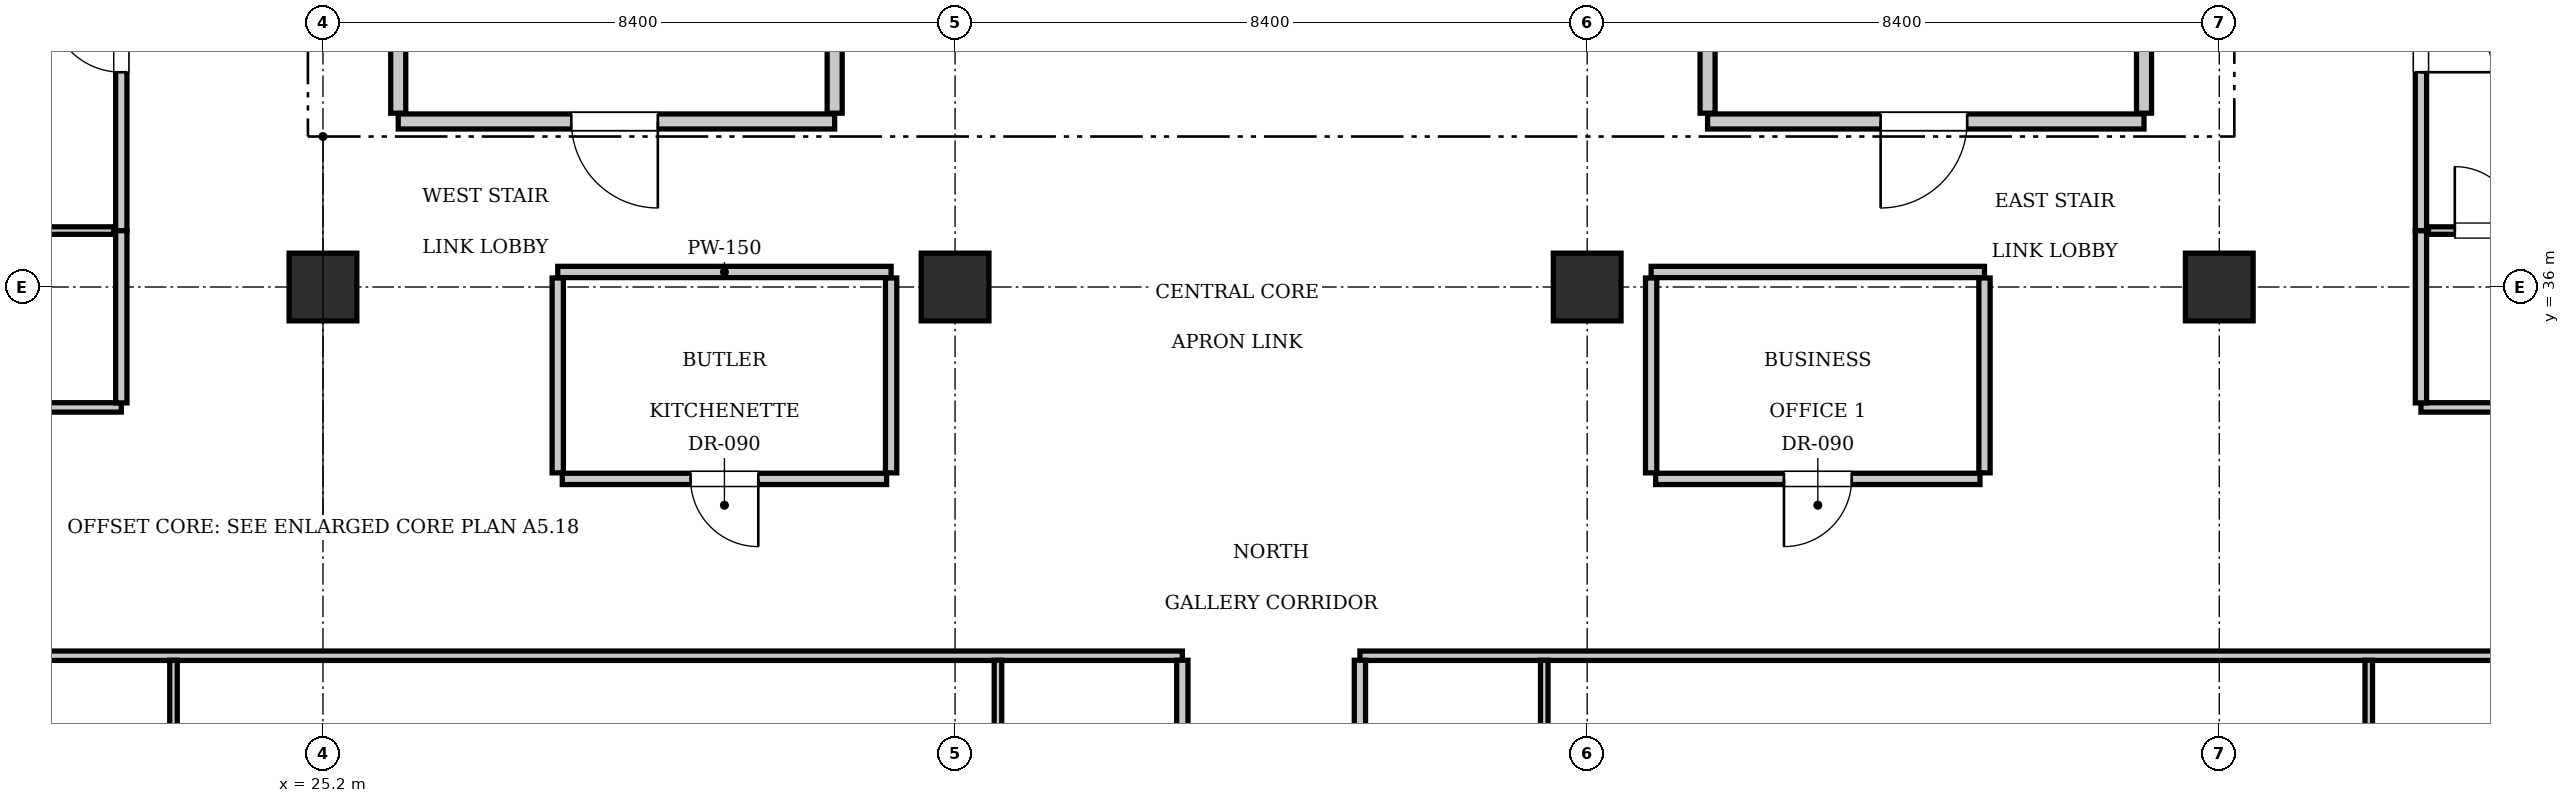
"""IFC4 building model, lengths in metres.
Left out: names, types, materials, properties, quantities, classifications, styles, units other than length and angle.
Written with IfcOpenShell. Run it as: python <this file> out.ifc"""

import sys

from ifc_helpers import new_model, si_unit, direction, frame, frame_2d, origin, origin_2d, place, context, subcontext, project, spatial, rectangle, extrude, element, fill, save


model = new_model("IFC4")
c1 = context("Model", 3, precision=1e-05, world=origin(), true_north=direction((0.0, 1.0)))
c2 = subcontext(c1, "Body", "Model", "MODEL_VIEW")
j1 = project(units=[si_unit("LENGTHUNIT", "METRE"), si_unit("PLANEANGLEUNIT", "RADIAN")], contexts=[c1])
p1 = place(None, origin())
s1 = spatial("IfcSite", under=j1, at=p1, CompositionType="ELEMENT")
p2 = place(p1, origin())
s2 = spatial("IfcBuilding", under=s1, at=p2, CompositionType="ELEMENT")
p3 = place(p2, frame((0.0, 0.0, 131.25)))
s3 = spatial("IfcBuildingStorey", under=s2, at=p3, CompositionType="ELEMENT", Elevation=131.25)
for number, where, z_axis, x_axis in (
    (1, (25.2, 36.0, 0.0), (0.0, 0.0, 1.0), (1.0, 0.0, 0.0)),
    (2, (33.6, 36.0, 0.0), (0.0, 0.0, 1.0), (1.0, 0.0, 0.0)),
    (3, (42.0, 36.0, 0.0), (0.0, 0.0, 1.0), (1.0, 0.0, 0.0)),
    (4, (50.4, 36.0, 0.0), (0.0, 0.0, 1.0), (1.0, 0.0, 0.0)),
):
    element("IfcColumn", number, at=place(p3, frame(where, z_axis=z_axis, x_axis=x_axis)), inside=s3, PredefinedType="COLUMN", context=c2, shape_type="SweptSolid", body=[
        extrude(rectangle(XDim=0.9, YDim=0.9, at=origin_2d()), origin(), (0.0, 0.0, 1.0), 3.85),
    ])
p4 = place(p3, frame((26.2, 38.2, 0.0), z_axis=(0.0, 0.0, 1.0), x_axis=(1.0, 0.0, 0.0)))
e5 = element("IfcWall", 5, at=p4, inside=s3, PredefinedType="PARTITIONING", context=c2, shape_type="SweptSolid", body=[
    extrude(rectangle(XDim=5.8, YDim=0.2, at=frame_2d((2.9, 0.0))), origin(), (0.0, 0.0, 1.0), 3.61),
])
p5 = place(p4, frame((2.3, 0.0, 0.0)))
e6 = element("IfcOpeningElement", 6, at=p5, cuts=e5, PredefinedType="OPENING", context=c2, shape_type="SweptSolid", body=[
    extrude(rectangle(XDim=1.15, YDim=2.15, at=frame_2d((0.575, 1.075))), frame((0.0, 0.11, 0.0), z_axis=(0.0, -1.0, 0.0), x_axis=(1.0, 0.0, 0.0)), (0.0, 0.0, 1.0), 0.22),
])
for number, where, z_axis, x_axis in (
    (7, (26.2, 38.31, 0.0), (0.0, 0.0, 1.0), (0.0, 1.0, 0.0)),
    (8, (32.0, 38.31, 0.0), (0.0, 0.0, 1.0), (0.0, 1.0, 0.0)),
):
    element("IfcWall", number, at=place(p3, frame(where, z_axis=z_axis, x_axis=x_axis)), inside=s3, PredefinedType="PARTITIONING", context=c2, shape_type="SweptSolid", body=[
        extrude(rectangle(XDim=3.07, YDim=0.2, at=frame_2d((1.535, 0.0))), origin(), (0.0, 0.0, 1.0), 3.61),
    ])
p6 = place(p3, frame((43.6, 38.2, 0.0), z_axis=(0.0, 0.0, 1.0), x_axis=(1.0, 0.0, 0.0)))
e9 = element("IfcWall", 9, at=p6, inside=s3, PredefinedType="PARTITIONING", context=c2, shape_type="SweptSolid", body=[
    extrude(rectangle(XDim=5.8, YDim=0.2, at=frame_2d((2.9, 0.0))), origin(), (0.0, 0.0, 1.0), 3.61),
])
p7 = place(p6, frame((2.3, 0.0, 0.0)))
e10 = element("IfcOpeningElement", 10, at=p7, cuts=e9, PredefinedType="OPENING", context=c2, shape_type="SweptSolid", body=[
    extrude(rectangle(XDim=1.15, YDim=2.15, at=frame_2d((0.575, 1.075))), frame((0.0, 0.11, 0.0), z_axis=(0.0, -1.0, 0.0), x_axis=(1.0, 0.0, 0.0)), (0.0, 0.0, 1.0), 0.22),
])
for number, where, z_axis, x_axis in (
    (11, (43.6, 38.31, 0.0), (0.0, 0.0, 1.0), (0.0, 1.0, 0.0)),
    (12, (49.4, 38.31, 0.0), (0.0, 0.0, 1.0), (0.0, 1.0, 0.0)),
):
    element("IfcWall", number, at=place(p3, frame(where, z_axis=z_axis, x_axis=x_axis)), inside=s3, PredefinedType="PARTITIONING", context=c2, shape_type="SweptSolid", body=[
        extrude(rectangle(XDim=3.07, YDim=0.2, at=frame_2d((1.535, 0.0))), origin(), (0.0, 0.0, 1.0), 3.61),
    ])
p8 = place(p3, frame((28.32, 36.2, 0.0), z_axis=(0.0, 0.0, 1.0), x_axis=(1.0, 0.0, 0.0)))
e13 = element("IfcWall", 13, at=p8, inside=s3, PredefinedType="PARTITIONING", context=c2, shape_type="SweptSolid", body=[
    extrude(rectangle(XDim=4.43, YDim=0.15, at=frame_2d((2.215, 0.0))), origin(), (0.0, 0.0, 1.0), 3.61),
])
for number, where, z_axis, x_axis in (
    (14, (28.32, 33.53, 0.0), (0.0, 0.0, 1.0), (0.0, 1.0, 0.0)),
    (15, (32.75, 33.53, 0.0), (0.0, 0.0, 1.0), (0.0, 1.0, 0.0)),
):
    element("IfcWall", number, at=place(p3, frame(where, z_axis=z_axis, x_axis=x_axis)), inside=s3, PredefinedType="PARTITIONING", context=c2, shape_type="SweptSolid", body=[
        extrude(rectangle(XDim=2.59, YDim=0.15, at=frame_2d((1.295, 0.0))), origin(), (0.0, 0.0, 1.0), 3.61),
    ])
p9 = place(p3, frame((28.38, 33.45, 0.0), z_axis=(0.0, 0.0, 1.0), x_axis=(1.0, 0.0, 0.0)))
e16 = element("IfcWall", 16, at=p9, inside=s3, PredefinedType="PARTITIONING", context=c2, shape_type="SweptSolid", body=[
    extrude(rectangle(XDim=4.31, YDim=0.15, at=frame_2d((2.155, 0.0))), origin(), (0.0, 0.0, 1.0), 3.61),
])
p10 = place(p9, frame((1.705, 0.0, 0.0)))
e17 = element("IfcOpeningElement", 17, at=p10, cuts=e16, PredefinedType="OPENING", context=c2, shape_type="SweptSolid", body=[
    extrude(rectangle(XDim=0.9, YDim=2.1, at=frame_2d((0.45, 1.05))), frame((0.0, 0.085, 0.0), z_axis=(0.0, -1.0, 0.0), x_axis=(1.0, 0.0, 0.0)), (0.0, 0.0, 1.0), 0.17),
])
p11 = place(p3, frame((42.85, 36.2, 0.0), z_axis=(0.0, 0.0, 1.0), x_axis=(1.0, 0.0, 0.0)))
e18 = element("IfcWall", 18, at=p11, inside=s3, PredefinedType="PARTITIONING", context=c2, shape_type="SweptSolid", body=[
    extrude(rectangle(XDim=4.43, YDim=0.15, at=frame_2d((2.215, 0.0))), origin(), (0.0, 0.0, 1.0), 3.61),
])
for number, where, z_axis, x_axis in (
    (19, (42.85, 33.53, 0.0), (0.0, 0.0, 1.0), (0.0, 1.0, 0.0)),
    (20, (47.28, 33.53, 0.0), (0.0, 0.0, 1.0), (0.0, 1.0, 0.0)),
):
    element("IfcWall", number, at=place(p3, frame(where, z_axis=z_axis, x_axis=x_axis)), inside=s3, PredefinedType="PARTITIONING", context=c2, shape_type="SweptSolid", body=[
        extrude(rectangle(XDim=2.59, YDim=0.15, at=frame_2d((1.295, 0.0))), origin(), (0.0, 0.0, 1.0), 3.61),
    ])
p12 = place(p3, frame((42.91, 33.45, 0.0), z_axis=(0.0, 0.0, 1.0), x_axis=(1.0, 0.0, 0.0)))
e21 = element("IfcWall", 21, at=p12, inside=s3, PredefinedType="PARTITIONING", context=c2, shape_type="SweptSolid", body=[
    extrude(rectangle(XDim=4.31, YDim=0.15, at=frame_2d((2.155, 0.0))), origin(), (0.0, 0.0, 1.0), 3.61),
])
p13 = place(p12, frame((1.705, 0.0, 0.0)))
e22 = element("IfcOpeningElement", 22, at=p13, cuts=e21, PredefinedType="OPENING", context=c2, shape_type="SweptSolid", body=[
    extrude(rectangle(XDim=0.9, YDim=2.1, at=frame_2d((0.45, 1.05))), frame((0.0, 0.085, 0.0), z_axis=(0.0, -1.0, 0.0), x_axis=(1.0, 0.0, 0.0)), (0.0, 0.0, 1.0), 0.17),
])
p14 = place(p3, frame((13.2, 31.1, 0.0), z_axis=(0.0, 0.0, 1.0), x_axis=(1.0, 0.0, 0.0)))
e23 = element("IfcWall", 23, at=p14, inside=s3, PredefinedType="PARTITIONING", context=c2, shape_type="SweptSolid", body=[
    extrude(rectangle(XDim=23.42, YDim=0.125, at=frame_2d((11.71, 0.0))), origin(), (0.0, 0.0, 1.0), 3.61),
])
p15 = place(p3, frame((38.98, 31.1, 0.0), z_axis=(0.0, 0.0, 1.0), x_axis=(1.0, 0.0, 0.0)))
e24 = element("IfcWall", 24, at=p15, inside=s3, PredefinedType="PARTITIONING", context=c2, shape_type="SweptSolid", body=[
    extrude(rectangle(XDim=23.42, YDim=0.125, at=frame_2d((11.71, 0.0))), origin(), (0.0, 0.0, 1.0), 3.61),
])
p16 = place(p3, frame((36.62, 29.15, 0.0), z_axis=(0.0, 0.0, 1.0), x_axis=(0.0, 1.0, 0.0)))
e25 = element("IfcWall", 25, at=p16, inside=s3, PredefinedType="PARTITIONING", context=c2, shape_type="SweptSolid", body=[
    extrude(rectangle(XDim=1.89, YDim=0.15, at=frame_2d((0.945, 0.0))), origin(), (0.0, 0.0, 1.0), 3.61),
])
p17 = place(p3, frame((34.17, 29.15, 0.0), z_axis=(0.0, 0.0, 1.0), x_axis=(0.0, 1.0, 0.0)))
e26 = element("IfcWall", 26, at=p17, inside=s3, PredefinedType="PARTITIONING", context=c2, shape_type="SweptSolid", body=[
    extrude(rectangle(XDim=1.89, YDim=0.1, at=frame_2d((0.945, 0.0))), origin(), (0.0, 0.0, 1.0), 3.61),
])
p18 = place(p3, frame((23.214, 27.16, 0.0), z_axis=(0.0, 0.0, 1.0), x_axis=(0.0, 1.0, 0.0)))
e27 = element("IfcWall", 27, at=p18, inside=s3, PredefinedType="PARTITIONING", context=c2, shape_type="SweptSolid", body=[
    extrude(rectangle(XDim=3.88, YDim=0.1, at=frame_2d((1.94, 0.0))), origin(), (0.0, 0.0, 1.0), 3.61),
])
p19 = place(p18, frame((1.49, 0.0, 0.0)))
e28 = element("IfcOpeningElement", 28, at=p19, cuts=e27, PredefinedType="OPENING", context=c2, shape_type="SweptSolid", body=[
    extrude(rectangle(XDim=0.9, YDim=2.1, at=frame_2d((0.45, 1.05))), frame((0.0, 0.06, 0.0), z_axis=(0.0, -1.0, 0.0), x_axis=(1.0, 0.0, 0.0)), (0.0, 0.0, 1.0), 0.12),
])
p20 = place(p3, frame((38.98, 29.15, 0.0), z_axis=(0.0, 0.0, 1.0), x_axis=(0.0, 1.0, 0.0)))
e29 = element("IfcWall", 29, at=p20, inside=s3, PredefinedType="PARTITIONING", context=c2, shape_type="SweptSolid", body=[
    extrude(rectangle(XDim=1.89, YDim=0.15, at=frame_2d((0.945, 0.0))), origin(), (0.0, 0.0, 1.0), 3.61),
])
p21 = place(p3, frame((41.43, 29.15, 0.0), z_axis=(0.0, 0.0, 1.0), x_axis=(0.0, 1.0, 0.0)))
e30 = element("IfcWall", 30, at=p21, inside=s3, PredefinedType="PARTITIONING", context=c2, shape_type="SweptSolid", body=[
    extrude(rectangle(XDim=1.89, YDim=0.1, at=frame_2d((0.945, 0.0))), origin(), (0.0, 0.0, 1.0), 3.61),
])
p22 = place(p3, frame((52.386, 27.16, 0.0), z_axis=(0.0, 0.0, 1.0), x_axis=(0.0, 1.0, 0.0)))
e31 = element("IfcWall", 31, at=p22, inside=s3, PredefinedType="PARTITIONING", context=c2, shape_type="SweptSolid", body=[
    extrude(rectangle(XDim=3.88, YDim=0.1, at=frame_2d((1.94, 0.0))), origin(), (0.0, 0.0, 1.0), 3.61),
])
p23 = place(p22, frame((1.49, 0.0, 0.0)))
e32 = element("IfcOpeningElement", 32, at=p23, cuts=e31, PredefinedType="OPENING", context=c2, shape_type="SweptSolid", body=[
    extrude(rectangle(XDim=0.9, YDim=2.1, at=frame_2d((0.45, 1.05))), frame((0.0, 0.06, 0.0), z_axis=(0.0, -1.0, 0.0), x_axis=(1.0, 0.0, 0.0)), (0.0, 0.0, 1.0), 0.12),
])
p24 = place(p3, frame((13.2, 34.4, 0.0), z_axis=(0.0, 0.0, 1.0), x_axis=(1.0, 0.0, 0.0)))
e33 = element("IfcWall", 33, at=p24, inside=s3, PredefinedType="PARTITIONING", context=c2, shape_type="SweptSolid", body=[
    extrude(rectangle(XDim=9.32, YDim=0.125, at=frame_2d((4.66, 0.0))), origin(), (0.0, 0.0, 1.0), 3.61),
])
p25 = place(p3, frame((53.08, 34.4, 0.0), z_axis=(0.0, 0.0, 1.0), x_axis=(1.0, 0.0, 0.0)))
e34 = element("IfcWall", 34, at=p25, inside=s3, PredefinedType="PARTITIONING", context=c2, shape_type="SweptSolid", body=[
    extrude(rectangle(XDim=9.32, YDim=0.125, at=frame_2d((4.66, 0.0))), origin(), (0.0, 0.0, 1.0), 3.61),
])
p26 = place(p3, frame((22.52, 34.46, 0.0), z_axis=(0.0, 0.0, 1.0), x_axis=(0.0, 1.0, 0.0)))
e35 = element("IfcWall", 35, at=p26, inside=s3, PredefinedType="PARTITIONING", context=c2, shape_type="SweptSolid", body=[
    extrude(rectangle(XDim=2.29, YDim=0.15, at=frame_2d((1.145, 0.0))), origin(), (0.0, 0.0, 1.0), 3.61),
])
p27 = place(p3, frame((22.52, 36.75, 0.0), z_axis=(0.0, 0.0, 1.0), x_axis=(0.0, 1.0, 0.0)))
e36 = element("IfcWall", 36, at=p27, inside=s3, PredefinedType="PARTITIONING", context=c2, shape_type="SweptSolid", body=[
    extrude(rectangle(XDim=5.159, YDim=0.15, at=frame_2d((2.579, 0.0))), origin(), (0.0, 0.0, 1.0), 3.61),
])
p28 = place(p27, frame((2.104, 0.0, 0.0)))
e37 = element("IfcOpeningElement", 37, at=p28, cuts=e36, PredefinedType="OPENING", context=c2, shape_type="SweptSolid", body=[
    extrude(rectangle(XDim=0.95, YDim=2.15, at=frame_2d((0.475, 1.075))), frame((0.0, 0.085, 0.0), z_axis=(0.0, -1.0, 0.0), x_axis=(1.0, 0.0, 0.0)), (0.0, 0.0, 1.0), 0.17),
])
p29 = place(p3, frame((20.12, 36.75, 0.0), z_axis=(0.0, 0.0, 1.0), x_axis=(1.0, 0.0, 0.0)))
e38 = element("IfcWall", 38, at=p29, inside=s3, PredefinedType="PARTITIONING", context=c2, shape_type="SweptSolid", body=[
    extrude(rectangle(XDim=2.3, YDim=0.1, at=frame_2d((1.15, 0.0))), origin(), (0.0, 0.0, 1.0), 3.61),
])
p30 = place(p29, frame((0.35, 0.0, 0.0)))
e39 = element("IfcOpeningElement", 39, at=p30, cuts=e38, PredefinedType="OPENING", context=c2, shape_type="SweptSolid", body=[
    extrude(rectangle(XDim=0.85, YDim=2.1, at=frame_2d((0.425, 1.05))), frame((0.0, 0.06, 0.0), z_axis=(0.0, -1.0, 0.0), x_axis=(1.0, 0.0, 0.0)), (0.0, 0.0, 1.0), 0.12),
])
p31 = place(p3, frame((53.08, 34.46, 0.0), z_axis=(0.0, 0.0, 1.0), x_axis=(0.0, 1.0, 0.0)))
e40 = element("IfcWall", 40, at=p31, inside=s3, PredefinedType="PARTITIONING", context=c2, shape_type="SweptSolid", body=[
    extrude(rectangle(XDim=2.29, YDim=0.15, at=frame_2d((1.145, 0.0))), origin(), (0.0, 0.0, 1.0), 3.61),
])
p32 = place(p3, frame((53.08, 36.75, 0.0), z_axis=(0.0, 0.0, 1.0), x_axis=(0.0, 1.0, 0.0)))
e41 = element("IfcWall", 41, at=p32, inside=s3, PredefinedType="PARTITIONING", context=c2, shape_type="SweptSolid", body=[
    extrude(rectangle(XDim=5.159, YDim=0.15, at=frame_2d((2.579, 0.0))), origin(), (0.0, 0.0, 1.0), 3.61),
])
p33 = place(p32, frame((2.104, 0.0, 0.0)))
e42 = element("IfcOpeningElement", 42, at=p33, cuts=e41, PredefinedType="OPENING", context=c2, shape_type="SweptSolid", body=[
    extrude(rectangle(XDim=0.95, YDim=2.15, at=frame_2d((0.475, 1.075))), frame((0.0, 0.085, 0.0), z_axis=(0.0, -1.0, 0.0), x_axis=(1.0, 0.0, 0.0)), (0.0, 0.0, 1.0), 0.17),
])
p34 = place(p3, frame((53.18, 36.75, 0.0), z_axis=(0.0, 0.0, 1.0), x_axis=(1.0, 0.0, 0.0)))
e43 = element("IfcWall", 43, at=p34, inside=s3, PredefinedType="PARTITIONING", context=c2, shape_type="SweptSolid", body=[
    extrude(rectangle(XDim=2.3, YDim=0.1, at=frame_2d((1.15, 0.0))), origin(), (0.0, 0.0, 1.0), 3.61),
])
p35 = place(p34, frame((0.35, 0.0, 0.0)))
e44 = element("IfcOpeningElement", 44, at=p35, cuts=e43, PredefinedType="OPENING", context=c2, shape_type="SweptSolid", body=[
    extrude(rectangle(XDim=0.85, YDim=2.1, at=frame_2d((0.425, 1.05))), frame((0.0, 0.06, 0.0), z_axis=(0.0, -1.0, 0.0), x_axis=(1.0, 0.0, 0.0)), (0.0, 0.0, 1.0), 0.12),
])
p36 = place(p5, frame((1.15, 0.0, 0.0), z_axis=(0.0, 0.0, 1.0), x_axis=(-1.0, 0.0, 0.0)))
e45 = element("IfcDoor", 45, at=p36, inside=s3, OperationType="SINGLE_SWING_LEFT", PredefinedType="DOOR", context=c2, shape_type="SweptSolid", body=[
    extrude(rectangle(XDim=1.15, YDim=2.15, at=frame_2d((0.575, 1.075))), frame((0.0, 0.025, 0.0), z_axis=(0.0, -1.0, 0.0), x_axis=(1.0, 0.0, 0.0)), (0.0, 0.0, 1.0), 0.05),
])
fill(e6, e45)
p37 = place(p7, frame((1.15, 0.0, 0.0), z_axis=(0.0, 0.0, 1.0), x_axis=(-1.0, 0.0, 0.0)))
e46 = element("IfcDoor", 46, at=p37, inside=s3, OperationType="SINGLE_SWING_RIGHT", PredefinedType="DOOR", context=c2, shape_type="SweptSolid", body=[
    extrude(rectangle(XDim=1.15, YDim=2.15, at=frame_2d((0.575, 1.075))), frame((0.0, 0.025, 0.0), z_axis=(0.0, -1.0, 0.0), x_axis=(1.0, 0.0, 0.0)), (0.0, 0.0, 1.0), 0.05),
])
fill(e10, e46)
p38 = place(p10, frame((0.9, 0.0, 0.0), z_axis=(0.0, 0.0, 1.0), x_axis=(-1.0, 0.0, 0.0)))
e47 = element("IfcDoor", 47, at=p38, inside=s3, OperationType="SINGLE_SWING_LEFT", PredefinedType="DOOR", context=c2, shape_type="SweptSolid", body=[
    extrude(rectangle(XDim=0.9, YDim=2.1, at=frame_2d((0.45, 1.05))), frame((0.0, 0.025, 0.0), z_axis=(0.0, -1.0, 0.0), x_axis=(1.0, 0.0, 0.0)), (0.0, 0.0, 1.0), 0.05),
])
fill(e17, e47)
p39 = place(p13, frame((0.9, 0.0, 0.0), z_axis=(0.0, 0.0, 1.0), x_axis=(-1.0, 0.0, 0.0)))
e48 = element("IfcDoor", 48, at=p39, inside=s3, OperationType="SINGLE_SWING_RIGHT", PredefinedType="DOOR", context=c2, shape_type="SweptSolid", body=[
    extrude(rectangle(XDim=0.9, YDim=2.1, at=frame_2d((0.45, 1.05))), frame((0.0, 0.025, 0.0), z_axis=(0.0, -1.0, 0.0), x_axis=(1.0, 0.0, 0.0)), (0.0, 0.0, 1.0), 0.05),
])
fill(e22, e48)
p40 = place(p28, origin())
e49 = element("IfcDoor", 49, at=p40, inside=s3, OperationType="SINGLE_SWING_RIGHT", PredefinedType="DOOR", context=c2, shape_type="SweptSolid", body=[
    extrude(rectangle(XDim=0.95, YDim=2.15, at=frame_2d((0.475, 1.075))), frame((0.0, 0.025, 0.0), z_axis=(0.0, -1.0, 0.0), x_axis=(1.0, 0.0, 0.0)), (0.0, 0.0, 1.0), 0.05),
])
fill(e37, e49)
p41 = place(p35, origin())
e50 = element("IfcDoor", 50, at=p41, inside=s3, OperationType="SINGLE_SWING_LEFT", PredefinedType="DOOR", context=c2, shape_type="SweptSolid", body=[
    extrude(rectangle(XDim=0.85, YDim=2.1, at=frame_2d((0.425, 1.05))), frame((0.0, 0.025, 0.0), z_axis=(0.0, -1.0, 0.0), x_axis=(1.0, 0.0, 0.0)), (0.0, 0.0, 1.0), 0.05),
])
fill(e44, e50)
p42 = place(p33, frame((0.95, 0.0, 0.0), z_axis=(0.0, 0.0, 1.0), x_axis=(-1.0, 0.0, 0.0)))
e51 = element("IfcDoor", 51, at=p42, inside=s3, OperationType="SINGLE_SWING_RIGHT", PredefinedType="DOOR", context=c2, shape_type="SweptSolid", body=[
    extrude(rectangle(XDim=0.95, YDim=2.15, at=frame_2d((0.475, 1.075))), frame((0.0, 0.025, 0.0), z_axis=(0.0, -1.0, 0.0), x_axis=(1.0, 0.0, 0.0)), (0.0, 0.0, 1.0), 0.05),
])
fill(e42, e51)
save(model, sys.argv[1])
